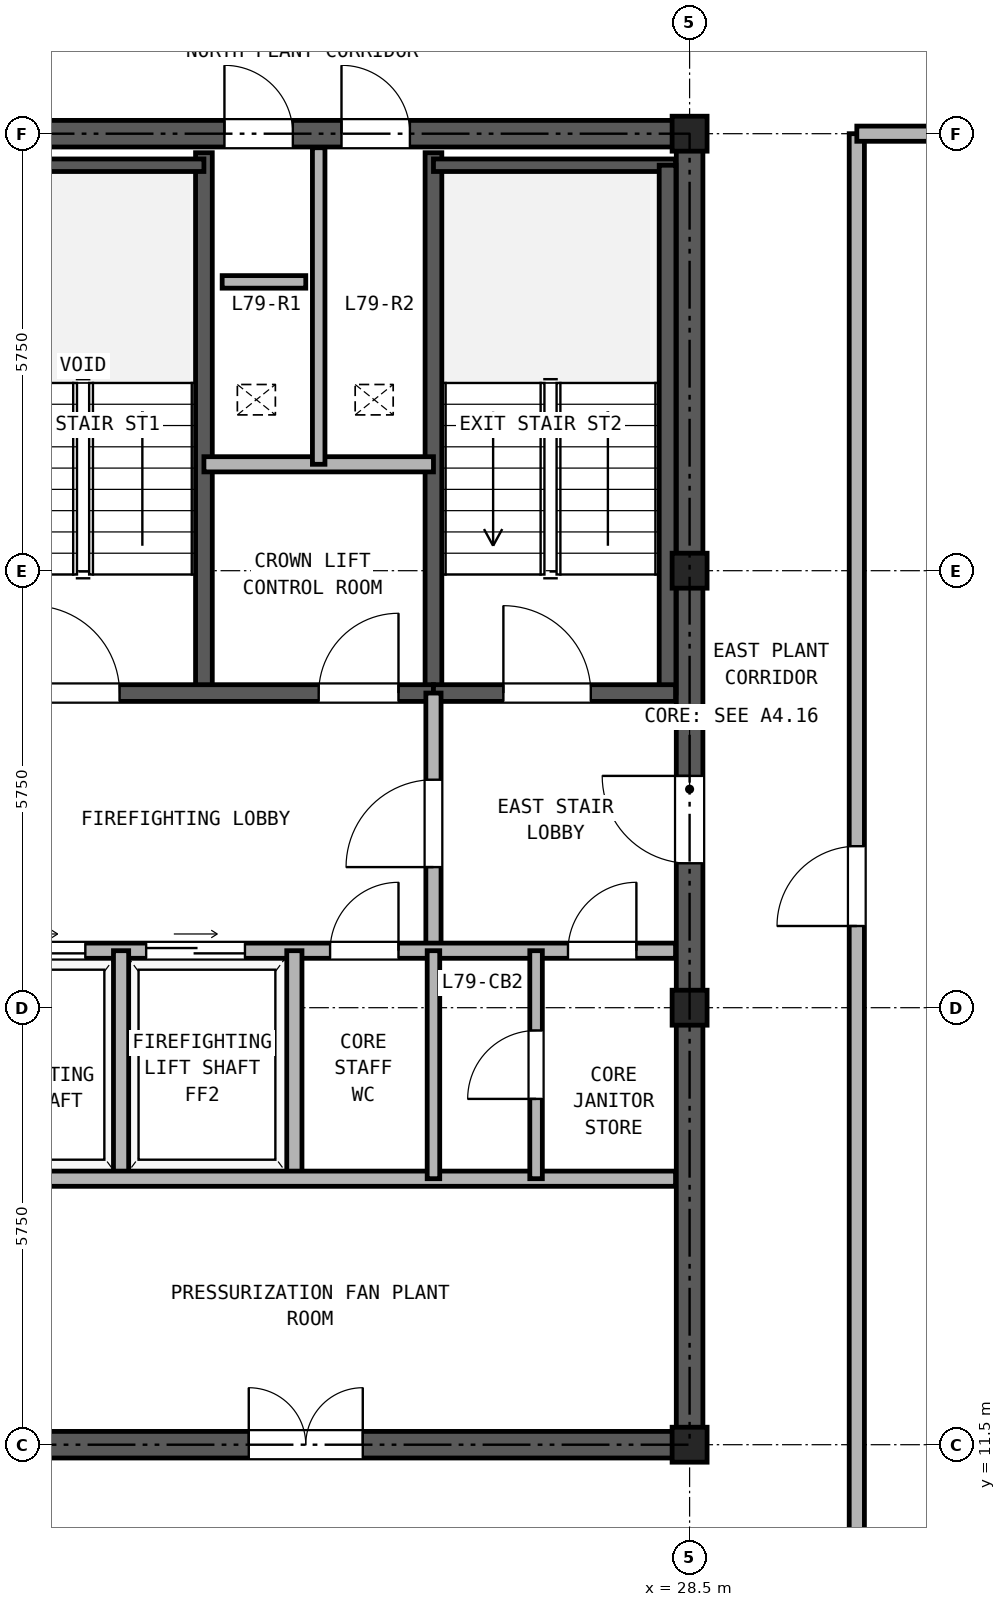
"""IFC4 building model, lengths in metres.
Left out: names, types, materials, properties, quantities, classifications, styles, units other than length and angle.
Written with IfcOpenShell. Run it as: python <this file> out.ifc"""

import sys

from ifc_helpers import new_model, si_unit, direction, frame, frame_2d, origin, origin_2d, place, context, subcontext, project, spatial, rectangle, hollow_rectangle, extrude, source, transform, mapped, element, fill, save


model = new_model("IFC4")
c1 = context("Model", 3, precision=1e-05, world=origin(), true_north=direction((0.0, 1.0)))
c2 = subcontext(c1, "Body", "Model", "MODEL_VIEW")
j1 = project(units=[si_unit("LENGTHUNIT", "METRE"), si_unit("PLANEANGLEUNIT", "RADIAN")], contexts=[c1])
p1 = place(None, origin())
s1 = spatial("IfcSite", under=j1, at=p1, CompositionType="ELEMENT")
p2 = place(p1, origin())
s2 = spatial("IfcBuilding", under=s1, at=p2, CompositionType="ELEMENT")
p3 = place(p2, frame((0.0, 0.0, 274.9)))
s3 = spatial("IfcBuildingStorey", under=s2, at=p3, CompositionType="ELEMENT", Elevation=274.9)
m1 = source(origin(), c2, "Body", "SweptSolid", [
    extrude(hollow_rectangle(XDim=0.46, YDim=0.46, WallThickness=0.025, at=origin_2d()), origin(), (0.0, 0.0, 1.0), 3.38),
])
for number, where, z_axis, x_axis in (
    (1, (28.5, 11.5, 0.0), (0.0, 0.0, 1.0), (1.0, 0.0, 0.0)),
    (2, (28.5, 17.25, 0.0), (0.0, 0.0, 1.0), (1.0, 0.0, 0.0)),
    (3, (28.5, 23.0, 0.0), (0.0, 0.0, 1.0), (1.0, 0.0, 0.0)),
    (4, (28.5, 28.75, 0.0), (0.0, 0.0, 1.0), (1.0, 0.0, 0.0)),
):
    element("IfcColumn", number, at=place(p3, frame(where, z_axis=z_axis, x_axis=x_axis)), inside=s3, PredefinedType="COLUMN", context=c2, shape_type="MappedRepresentation", body=[
        mapped(m1, transform((0.0, 0.0, 0.0), x_axis=(1.0, 0.0, 0.0), y_axis=(0.0, 1.0, 0.0), z_axis=(0.0, 0.0, 1.0), scale=1.0)),
    ])
p4 = place(p3, frame((18.325, 11.5, 0.0), z_axis=(0.0, 0.0, 1.0), x_axis=(1.0, 0.0, 0.0)))
e5 = element("IfcWall", 5, at=p4, inside=s3, PredefinedType="SHEAR", context=c2, shape_type="SweptSolid", body=[
    extrude(rectangle(XDim=10.35, YDim=0.35, at=frame_2d((5.175, 0.0))), origin(), (0.0, 0.0, 1.0), 3.38),
])
p5 = place(p4, frame((4.375, 0.0, 0.0)))
e6 = element("IfcOpeningElement", 6, at=p5, cuts=e5, PredefinedType="OPENING", context=c2, shape_type="SweptSolid", body=[
    extrude(rectangle(XDim=1.5, YDim=2.25, at=frame_2d((0.75, 1.125))), frame((0.0, 0.185, 0.0), z_axis=(0.0, -1.0, 0.0), x_axis=(1.0, 0.0, 0.0)), (0.0, 0.0, 1.0), 0.37),
])
p6 = place(p3, frame((18.325, 28.75, 0.0), z_axis=(0.0, 0.0, 1.0), x_axis=(1.0, 0.0, 0.0)))
e7 = element("IfcWall", 7, at=p6, inside=s3, PredefinedType="SHEAR", context=c2, shape_type="SweptSolid", body=[
    extrude(rectangle(XDim=10.35, YDim=0.35, at=frame_2d((5.175, 0.0))), origin(), (0.0, 0.0, 1.0), 3.38),
])
p7 = place(p6, frame((4.055, 0.0, 0.0)))
e8 = element("IfcOpeningElement", 8, at=p7, cuts=e7, PredefinedType="OPENING", context=c2, shape_type="SweptSolid", body=[
    extrude(rectangle(XDim=0.9, YDim=2.05, at=frame_2d((0.45, 1.025))), frame((0.0, 0.185, 0.0), z_axis=(0.0, -1.0, 0.0), x_axis=(1.0, 0.0, 0.0)), (0.0, 0.0, 1.0), 0.37),
])
p8 = place(p6, frame((5.595, 0.0, 0.0)))
e9 = element("IfcOpeningElement", 9, at=p8, cuts=e7, PredefinedType="OPENING", context=c2, shape_type="SweptSolid", body=[
    extrude(rectangle(XDim=0.9, YDim=2.05, at=frame_2d((0.45, 1.025))), frame((0.0, 0.185, 0.0), z_axis=(0.0, -1.0, 0.0), x_axis=(1.0, 0.0, 0.0)), (0.0, 0.0, 1.0), 0.37),
])
p9 = place(p3, frame((28.5, 11.675, 0.0), z_axis=(0.0, 0.0, 1.0), x_axis=(0.0, 1.0, 0.0)))
e10 = element("IfcWall", 10, at=p9, inside=s3, PredefinedType="SHEAR", context=c2, shape_type="SweptSolid", body=[
    extrude(rectangle(XDim=16.9, YDim=0.35, at=frame_2d((8.45, 0.0))), origin(), (0.0, 0.0, 1.0), 3.38),
])
p10 = place(p9, frame((7.475, 0.0, 0.0)))
e11 = element("IfcOpeningElement", 11, at=p10, cuts=e10, PredefinedType="OPENING", context=c2, shape_type="SweptSolid", body=[
    extrude(rectangle(XDim=1.15, YDim=2.2, at=frame_2d((0.575, 1.1))), frame((0.0, 0.185, 0.0), z_axis=(0.0, -1.0, 0.0), x_axis=(1.0, 0.0, 0.0)), (0.0, 0.0, 1.0), 0.37),
])
for number, where, z_axis, x_axis in (
    (12, (22.11, 21.39, 0.0), (0.0, 0.0, 1.0), (0.0, 1.0, 0.0)),
    (13, (25.13, 21.39, 0.0), (0.0, 0.0, 1.0), (0.0, 1.0, 0.0)),
):
    element("IfcWall", number, at=place(p3, frame(where, z_axis=z_axis, x_axis=x_axis)), inside=s3, PredefinedType="SOLIDWALL", context=c2, shape_type="SweptSolid", body=[
        extrude(rectangle(XDim=7.11, YDim=0.22, at=frame_2d((3.555, 0.0))), origin(), (0.0, 0.0, 1.0), 3.38),
    ])
p11 = place(p3, frame((18.685, 28.335, 0.0), z_axis=(0.0, 0.0, 1.0), x_axis=(1.0, 0.0, 0.0)))
e14 = element("IfcWall", 14, at=p11, inside=s3, PredefinedType="PARTITIONING", context=c2, shape_type="SweptSolid", body=[
    extrude(rectangle(XDim=3.425, YDim=0.165, at=frame_2d((1.712, 0.0))), origin(), (0.0, 0.0, 1.0), 3.38),
])
p12 = place(p3, frame((25.13, 28.335, 0.0), z_axis=(0.0, 0.0, 1.0), x_axis=(1.0, 0.0, 0.0)))
e15 = element("IfcWall", 15, at=p12, inside=s3, PredefinedType="PARTITIONING", context=c2, shape_type="SweptSolid", body=[
    extrude(rectangle(XDim=3.185, YDim=0.165, at=frame_2d((1.593, 0.0))), origin(), (0.0, 0.0, 1.0), 3.38),
])
p13 = place(p3, frame((28.21, 21.39, 0.0), z_axis=(0.0, 0.0, 1.0), x_axis=(0.0, 1.0, 0.0)))
e16 = element("IfcWall", 16, at=p13, inside=s3, PredefinedType="SOLIDWALL", context=c2, shape_type="SweptSolid", body=[
    extrude(rectangle(XDim=6.945, YDim=0.22, at=frame_2d((3.473, 0.0))), origin(), (0.0, 0.0, 1.0), 3.38),
])
p14 = place(p3, frame((18.685, 21.39, 0.0), z_axis=(0.0, 0.0, 1.0), x_axis=(1.0, 0.0, 0.0)))
e17 = element("IfcWall", 17, at=p14, inside=s3, PredefinedType="SOLIDWALL", context=c2, shape_type="SweptSolid", body=[
    extrude(rectangle(XDim=6.445, YDim=0.22, at=frame_2d((3.222, 0.0))), origin(), (0.0, 0.0, 1.0), 3.38),
])
p15 = place(p14, frame((1.165, 0.0, 0.0)))
e18 = element("IfcOpeningElement", 18, at=p15, cuts=e17, PredefinedType="OPENING", context=c2, shape_type="SweptSolid", body=[
    extrude(rectangle(XDim=1.15, YDim=2.2, at=frame_2d((0.575, 1.1))), frame((0.0, 0.12, 0.0), z_axis=(0.0, -1.0, 0.0), x_axis=(1.0, 0.0, 0.0)), (0.0, 0.0, 1.0), 0.24),
])
p16 = place(p14, frame((4.935, 0.0, 0.0)))
e19 = element("IfcOpeningElement", 19, at=p16, cuts=e17, PredefinedType="OPENING", context=c2, shape_type="SweptSolid", body=[
    extrude(rectangle(XDim=1.05, YDim=2.15, at=frame_2d((0.525, 1.075))), frame((0.0, 0.12, 0.0), z_axis=(0.0, -1.0, 0.0), x_axis=(1.0, 0.0, 0.0)), (0.0, 0.0, 1.0), 0.24),
])
p17 = place(p3, frame((25.13, 21.39, 0.0), z_axis=(0.0, 0.0, 1.0), x_axis=(1.0, 0.0, 0.0)))
e20 = element("IfcWall", 20, at=p17, inside=s3, PredefinedType="SOLIDWALL", context=c2, shape_type="SweptSolid", body=[
    extrude(rectangle(XDim=3.185, YDim=0.22, at=frame_2d((1.593, 0.0))), origin(), (0.0, 0.0, 1.0), 3.38),
])
p18 = place(p17, frame((0.92, 0.0, 0.0)))
e21 = element("IfcOpeningElement", 21, at=p18, cuts=e20, PredefinedType="OPENING", context=c2, shape_type="SweptSolid", body=[
    extrude(rectangle(XDim=1.15, YDim=2.2, at=frame_2d((0.575, 1.1))), frame((0.0, 0.12, 0.0), z_axis=(0.0, -1.0, 0.0), x_axis=(1.0, 0.0, 0.0)), (0.0, 0.0, 1.0), 0.24),
])
p19 = place(p3, frame((22.11, 24.4, 0.0), z_axis=(0.0, 0.0, 1.0), x_axis=(1.0, 0.0, 0.0)))
e22 = element("IfcWall", 22, at=p19, inside=s3, PredefinedType="PARTITIONING", context=c2, shape_type="SweptSolid", body=[
    extrude(rectangle(XDim=3.02, YDim=0.2, at=frame_2d((1.51, 0.0))), origin(), (0.0, 0.0, 1.0), 3.38),
])
p20 = place(p3, frame((23.62, 24.4, 0.0), z_axis=(0.0, 0.0, 1.0), x_axis=(0.0, 1.0, 0.0)))
e23 = element("IfcWall", 23, at=p20, inside=s3, PredefinedType="PARTITIONING", context=c2, shape_type="SweptSolid", body=[
    extrude(rectangle(XDim=4.165, YDim=0.165, at=frame_2d((2.083, 0.0))), origin(), (0.0, 0.0, 1.0), 3.38),
])
p21 = place(p3, frame((25.13, 18.0, 0.0), z_axis=(0.0, 0.0, 1.0), x_axis=(0.0, 1.0, 0.0)))
e24 = element("IfcWall", 24, at=p21, inside=s3, PredefinedType="PARTITIONING", context=c2, shape_type="SweptSolid", body=[
    extrude(rectangle(XDim=3.39, YDim=0.2, at=frame_2d((1.695, 0.0))), origin(), (0.0, 0.0, 1.0), 3.38),
])
p22 = place(p21, frame((1.1, 0.0, 0.0)))
e25 = element("IfcOpeningElement", 25, at=p22, cuts=e24, PredefinedType="OPENING", context=c2, shape_type="SweptSolid", body=[
    extrude(rectangle(XDim=1.15, YDim=2.2, at=frame_2d((0.575, 1.1))), frame((0.0, 0.11, 0.0), z_axis=(0.0, -1.0, 0.0), x_axis=(1.0, 0.0, 0.0)), (0.0, 0.0, 1.0), 0.22),
])
p23 = place(p3, frame((18.685, 18.0, 0.0), z_axis=(0.0, 0.0, 1.0), x_axis=(1.0, 0.0, 0.0)))
e26 = element("IfcWall", 26, at=p23, inside=s3, PredefinedType="PARTITIONING", context=c2, shape_type="SweptSolid", body=[
    extrude(rectangle(XDim=9.63, YDim=0.2, at=frame_2d((4.815, 0.0))), origin(), (0.0, 0.0, 1.0), 3.38),
])
p24 = place(p23, frame((0.565, 0.0, 0.0)))
e27 = element("IfcOpeningElement", 27, at=p24, cuts=e26, PredefinedType="OPENING", context=c2, shape_type="SweptSolid", body=[
    extrude(rectangle(XDim=1.3, YDim=2.3, at=frame_2d((0.65, 1.15))), frame((0.0, 0.11, 0.0), z_axis=(0.0, -1.0, 0.0), x_axis=(1.0, 0.0, 0.0)), (0.0, 0.0, 1.0), 0.22),
])
p25 = place(p23, frame((2.665, 0.0, 0.0)))
e28 = element("IfcOpeningElement", 28, at=p25, cuts=e26, PredefinedType="OPENING", context=c2, shape_type="SweptSolid", body=[
    extrude(rectangle(XDim=1.3, YDim=2.3, at=frame_2d((0.65, 1.15))), frame((0.0, 0.11, 0.0), z_axis=(0.0, -1.0, 0.0), x_axis=(1.0, 0.0, 0.0)), (0.0, 0.0, 1.0), 0.22),
])
p26 = place(p23, frame((5.085, 0.0, 0.0)))
e29 = element("IfcOpeningElement", 29, at=p26, cuts=e26, PredefinedType="OPENING", context=c2, shape_type="SweptSolid", body=[
    extrude(rectangle(XDim=0.9, YDim=2.05, at=frame_2d((0.45, 1.025))), frame((0.0, 0.11, 0.0), z_axis=(0.0, -1.0, 0.0), x_axis=(1.0, 0.0, 0.0)), (0.0, 0.0, 1.0), 0.22),
])
p27 = place(p23, frame((8.215, 0.0, 0.0)))
e30 = element("IfcOpeningElement", 30, at=p27, cuts=e26, PredefinedType="OPENING", context=c2, shape_type="SweptSolid", body=[
    extrude(rectangle(XDim=0.9, YDim=2.05, at=frame_2d((0.45, 1.025))), frame((0.0, 0.11, 0.0), z_axis=(0.0, -1.0, 0.0), x_axis=(1.0, 0.0, 0.0)), (0.0, 0.0, 1.0), 0.22),
])
for number, where, z_axis, x_axis in (
    (31, (21.02, 15.0, 0.0), (0.0, 0.0, 1.0), (0.0, 1.0, 0.0)),
    (32, (23.3, 15.0, 0.0), (0.0, 0.0, 1.0), (0.0, 1.0, 0.0)),
):
    element("IfcWall", number, at=place(p3, frame(where, z_axis=z_axis, x_axis=x_axis)), inside=s3, PredefinedType="PARTITIONING", context=c2, shape_type="SweptSolid", body=[
        extrude(rectangle(XDim=3.0, YDim=0.2, at=frame_2d((1.5, 0.0))), origin(), (0.0, 0.0, 1.0), 3.38),
    ])
p28 = place(p3, frame((18.685, 15.0, 0.0), z_axis=(0.0, 0.0, 1.0), x_axis=(1.0, 0.0, 0.0)))
e33 = element("IfcWall", 33, at=p28, inside=s3, PredefinedType="PARTITIONING", context=c2, shape_type="SweptSolid", body=[
    extrude(rectangle(XDim=9.63, YDim=0.2, at=frame_2d((4.815, 0.0))), origin(), (0.0, 0.0, 1.0), 3.38),
])
p29 = place(p3, frame((25.13, 15.0, 0.0), z_axis=(0.0, 0.0, 1.0), x_axis=(0.0, 1.0, 0.0)))
e34 = element("IfcWall", 34, at=p29, inside=s3, PredefinedType="PARTITIONING", context=c2, shape_type="SweptSolid", body=[
    extrude(rectangle(XDim=3.0, YDim=0.165, at=frame_2d((1.5, 0.0))), origin(), (0.0, 0.0, 1.0), 3.38),
])
p30 = place(p3, frame((26.48, 15.0, 0.0), z_axis=(0.0, 0.0, 1.0), x_axis=(0.0, 1.0, 0.0)))
e35 = element("IfcWall", 35, at=p30, inside=s3, PredefinedType="PARTITIONING", context=c2, shape_type="SweptSolid", body=[
    extrude(rectangle(XDim=3.0, YDim=0.165, at=frame_2d((1.5, 0.0))), origin(), (0.0, 0.0, 1.0), 3.38),
])
p31 = place(p30, frame((1.05, 0.0, 0.0)))
e36 = element("IfcOpeningElement", 36, at=p31, cuts=e35, PredefinedType="OPENING", context=c2, shape_type="SweptSolid", body=[
    extrude(rectangle(XDim=0.9, YDim=2.05, at=frame_2d((0.45, 1.025))), frame((0.0, 0.093, 0.0), z_axis=(0.0, -1.0, 0.0), x_axis=(1.0, 0.0, 0.0)), (0.0, 0.0, 1.0), 0.185),
])
p32 = place(p3, frame((30.7, 8.9, 0.0), z_axis=(0.0, 0.0, 1.0), x_axis=(0.0, 1.0, 0.0)))
e37 = element("IfcWall", 37, at=p32, inside=s3, PredefinedType="PARTITIONING", context=c2, shape_type="SweptSolid", body=[
    extrude(rectangle(XDim=19.85, YDim=0.2, at=frame_2d((9.925, 0.0))), origin(), (0.0, 0.0, 1.0), 3.38),
])
p33 = place(p32, frame((9.425, 0.0, 0.0)))
e38 = element("IfcOpeningElement", 38, at=p33, cuts=e37, PredefinedType="OPENING", context=c2, shape_type="SweptSolid", body=[
    extrude(rectangle(XDim=1.05, YDim=2.15, at=frame_2d((0.525, 1.075))), frame((0.0, 0.11, 0.0), z_axis=(0.0, -1.0, 0.0), x_axis=(1.0, 0.0, 0.0)), (0.0, 0.0, 1.0), 0.22),
])
p34 = place(p3, frame((30.7, 28.75, 0.0), z_axis=(0.0, 0.0, 1.0), x_axis=(1.0, 0.0, 0.0)))
e39 = element("IfcWall", 39, at=p34, inside=s3, PredefinedType="PARTITIONING", context=c2, shape_type="SweptSolid", body=[
    extrude(rectangle(XDim=10.85, YDim=0.2, at=frame_2d((5.425, 0.0))), origin(), (0.0, 0.0, 1.0), 2.905),
])
p35 = place(p3, frame((22.35, 26.8, 0.0), z_axis=(0.0, 0.0, 1.0), x_axis=(1.0, 0.0, 0.0)))
e40 = element("IfcWall", 40, at=p35, inside=s3, PredefinedType="PARTITIONING", context=c2, shape_type="SweptSolid", body=[
    extrude(rectangle(XDim=1.1, YDim=0.165, at=frame_2d((0.55, 0.0))), origin(), (0.0, 0.0, 1.0), 3.38),
])
p36 = place(p15, frame((1.15, 0.0, 0.0), z_axis=(0.0, 0.0, 1.0), x_axis=(-1.0, 0.0, 0.0)))
e41 = element("IfcDoor", 41, at=p36, inside=s3, OperationType="SINGLE_SWING_LEFT", PredefinedType="DOOR", context=c2, shape_type="SweptSolid", body=[
    extrude(rectangle(XDim=1.15, YDim=2.2, at=frame_2d((0.575, 1.1))), frame((0.0, 0.025, 0.0), z_axis=(0.0, -1.0, 0.0), x_axis=(1.0, 0.0, 0.0)), (0.0, 0.0, 1.0), 0.05),
])
fill(e18, e41)
p37 = place(p18, frame((1.15, 0.0, 0.0), z_axis=(0.0, 0.0, 1.0), x_axis=(-1.0, 0.0, 0.0)))
e42 = element("IfcDoor", 42, at=p37, inside=s3, OperationType="SINGLE_SWING_LEFT", PredefinedType="DOOR", context=c2, shape_type="SweptSolid", body=[
    extrude(rectangle(XDim=1.15, YDim=2.2, at=frame_2d((0.575, 1.1))), frame((0.0, 0.025, 0.0), z_axis=(0.0, -1.0, 0.0), x_axis=(1.0, 0.0, 0.0)), (0.0, 0.0, 1.0), 0.05),
])
fill(e21, e42)
p38 = place(p16, origin())
e43 = element("IfcDoor", 43, at=p38, inside=s3, OperationType="SINGLE_SWING_RIGHT", PredefinedType="DOOR", context=c2, shape_type="SweptSolid", body=[
    extrude(rectangle(XDim=1.05, YDim=2.15, at=frame_2d((0.525, 1.075))), frame((0.0, 0.025, 0.0), z_axis=(0.0, -1.0, 0.0), x_axis=(1.0, 0.0, 0.0)), (0.0, 0.0, 1.0), 0.05),
])
fill(e19, e43)
p39 = place(p22, origin())
e44 = element("IfcDoor", 44, at=p39, inside=s3, OperationType="SINGLE_SWING_LEFT", PredefinedType="DOOR", context=c2, shape_type="SweptSolid", body=[
    extrude(rectangle(XDim=1.15, YDim=2.2, at=frame_2d((0.575, 1.1))), frame((0.0, 0.025, 0.0), z_axis=(0.0, -1.0, 0.0), x_axis=(1.0, 0.0, 0.0)), (0.0, 0.0, 1.0), 0.05),
])
fill(e25, e44)
p40 = place(p24, origin())
e45 = element("IfcDoor", 45, at=p40, inside=s3, OperationType="DOUBLE_DOOR_SLIDING", PredefinedType="DOOR", context=c2, shape_type="SweptSolid", body=[
    extrude(rectangle(XDim=1.3, YDim=2.3, at=frame_2d((0.65, 1.15))), frame((0.0, 0.025, 0.0), z_axis=(0.0, -1.0, 0.0), x_axis=(1.0, 0.0, 0.0)), (0.0, 0.0, 1.0), 0.05),
])
fill(e27, e45)
p41 = place(p25, origin())
e46 = element("IfcDoor", 46, at=p41, inside=s3, OperationType="DOUBLE_DOOR_SLIDING", PredefinedType="DOOR", context=c2, shape_type="SweptSolid", body=[
    extrude(rectangle(XDim=1.3, YDim=2.3, at=frame_2d((0.65, 1.15))), frame((0.0, 0.025, 0.0), z_axis=(0.0, -1.0, 0.0), x_axis=(1.0, 0.0, 0.0)), (0.0, 0.0, 1.0), 0.05),
])
fill(e28, e46)
p42 = place(p26, frame((0.9, 0.0, 0.0), z_axis=(0.0, 0.0, 1.0), x_axis=(-1.0, 0.0, 0.0)))
e47 = element("IfcDoor", 47, at=p42, inside=s3, OperationType="SINGLE_SWING_RIGHT", PredefinedType="DOOR", context=c2, shape_type="SweptSolid", body=[
    extrude(rectangle(XDim=0.9, YDim=2.05, at=frame_2d((0.45, 1.025))), frame((0.0, 0.025, 0.0), z_axis=(0.0, -1.0, 0.0), x_axis=(1.0, 0.0, 0.0)), (0.0, 0.0, 1.0), 0.05),
])
fill(e29, e47)
p43 = place(p31, origin())
e48 = element("IfcDoor", 48, at=p43, inside=s3, OperationType="SINGLE_SWING_LEFT", PredefinedType="DOOR", context=c2, shape_type="SweptSolid", body=[
    extrude(rectangle(XDim=0.9, YDim=2.05, at=frame_2d((0.45, 1.025))), frame((0.0, 0.025, 0.0), z_axis=(0.0, -1.0, 0.0), x_axis=(1.0, 0.0, 0.0)), (0.0, 0.0, 1.0), 0.05),
])
fill(e36, e48)
p44 = place(p27, frame((0.9, 0.0, 0.0), z_axis=(0.0, 0.0, 1.0), x_axis=(-1.0, 0.0, 0.0)))
e49 = element("IfcDoor", 49, at=p44, inside=s3, OperationType="SINGLE_SWING_RIGHT", PredefinedType="DOOR", context=c2, shape_type="SweptSolid", body=[
    extrude(rectangle(XDim=0.9, YDim=2.05, at=frame_2d((0.45, 1.025))), frame((0.0, 0.025, 0.0), z_axis=(0.0, -1.0, 0.0), x_axis=(1.0, 0.0, 0.0)), (0.0, 0.0, 1.0), 0.05),
])
fill(e30, e49)
p45 = place(p10, origin())
e50 = element("IfcDoor", 50, at=p45, inside=s3, OperationType="SINGLE_SWING_RIGHT", PredefinedType="DOOR", context=c2, shape_type="SweptSolid", body=[
    extrude(rectangle(XDim=1.15, YDim=2.2, at=frame_2d((0.575, 1.1))), frame((0.0, 0.025, 0.0), z_axis=(0.0, -1.0, 0.0), x_axis=(1.0, 0.0, 0.0)), (0.0, 0.0, 1.0), 0.05),
])
fill(e11, e50)
p46 = place(p7, origin())
e51 = element("IfcDoor", 51, at=p46, inside=s3, OperationType="SINGLE_SWING_LEFT", PredefinedType="DOOR", context=c2, shape_type="SweptSolid", body=[
    extrude(rectangle(XDim=0.9, YDim=2.05, at=frame_2d((0.45, 1.025))), frame((0.0, 0.025, 0.0), z_axis=(0.0, -1.0, 0.0), x_axis=(1.0, 0.0, 0.0)), (0.0, 0.0, 1.0), 0.05),
])
fill(e8, e51)
p47 = place(p8, origin())
e52 = element("IfcDoor", 52, at=p47, inside=s3, OperationType="SINGLE_SWING_LEFT", PredefinedType="DOOR", context=c2, shape_type="SweptSolid", body=[
    extrude(rectangle(XDim=0.9, YDim=2.05, at=frame_2d((0.45, 1.025))), frame((0.0, 0.025, 0.0), z_axis=(0.0, -1.0, 0.0), x_axis=(1.0, 0.0, 0.0)), (0.0, 0.0, 1.0), 0.05),
])
fill(e9, e52)
p48 = place(p5, frame((1.5, 0.0, 0.0), z_axis=(0.0, 0.0, 1.0), x_axis=(-1.0, 0.0, 0.0)))
e53 = element("IfcDoor", 53, at=p48, inside=s3, OperationType="DOUBLE_DOOR_SINGLE_SWING", PredefinedType="DOOR", context=c2, shape_type="SweptSolid", body=[
    extrude(rectangle(XDim=1.5, YDim=2.25, at=frame_2d((0.75, 1.125))), frame((0.0, 0.025, 0.0), z_axis=(0.0, -1.0, 0.0), x_axis=(1.0, 0.0, 0.0)), (0.0, 0.0, 1.0), 0.05),
])
fill(e6, e53)
p49 = place(p33, origin())
e54 = element("IfcDoor", 54, at=p49, inside=s3, OperationType="SINGLE_SWING_LEFT", PredefinedType="DOOR", context=c2, shape_type="SweptSolid", body=[
    extrude(rectangle(XDim=1.05, YDim=2.15, at=frame_2d((0.525, 1.075))), frame((0.0, 0.025, 0.0), z_axis=(0.0, -1.0, 0.0), x_axis=(1.0, 0.0, 0.0)), (0.0, 0.0, 1.0), 0.05),
])
fill(e38, e54)
save(model, sys.argv[1])
